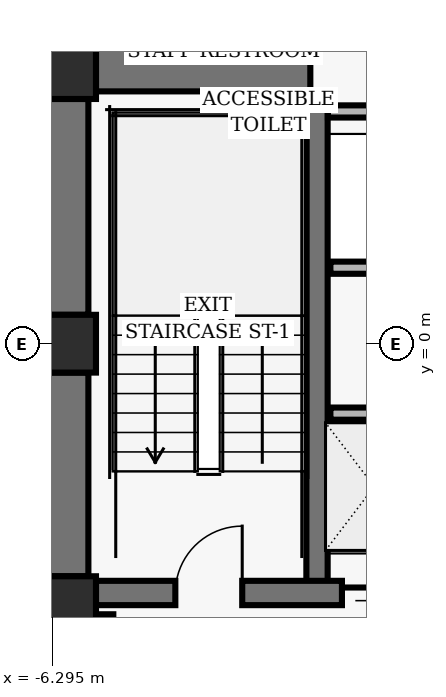
"""IFC4 building model, lengths in metres.
Left out: names, types, materials, properties, quantities, classifications, styles, units other than length and angle.
Written with IfcOpenShell. Run it as: python <this file> out.ifc"""

import sys

from ifc_helpers import new_model, si_unit, direction, frame, frame_2d, origin, origin_2d, place, context, subcontext, project, spatial, rectangle, hollow_rectangle, extrude, element, fill, save


model = new_model("IFC4")
c1 = context("Model", 3, precision=1e-05, world=origin(), true_north=direction((0.0, 1.0)))
c2 = subcontext(c1, "Body", "Model", "MODEL_VIEW")
j1 = project(units=[si_unit("LENGTHUNIT", "METRE"), si_unit("PLANEANGLEUNIT", "RADIAN")], contexts=[c1])
p1 = place(None, origin())
s1 = spatial("IfcSite", under=j1, at=p1, CompositionType="ELEMENT")
p2 = place(p1, origin())
s2 = spatial("IfcBuilding", under=s1, at=p2, CompositionType="ELEMENT")
p3 = place(p2, frame((0.0, 0.0, 91.68)))
s3 = spatial("IfcBuildingStorey", under=s2, at=p3, CompositionType="ELEMENT", Elevation=91.68)
for number, where, z_axis, x_axis in (
    (1, (-6.05, 4.5, 0.0), (0.0, 0.0, 1.0), (1.0, 0.0, 0.0)),
    (2, (-6.05, 0.0, 0.0), (0.0, 0.0, 1.0), (1.0, 0.0, 0.0)),
    (3, (-6.05, -4.3, 0.0), (0.0, 0.0, 1.0), (1.0, 0.0, 0.0)),
):
    element("IfcColumn", number, at=place(p3, frame(where, z_axis=z_axis, x_axis=x_axis)), inside=s3, PredefinedType="COLUMN", context=c2, shape_type="SweptSolid", body=[
        extrude(hollow_rectangle(XDim=0.95, YDim=0.95, WallThickness=0.06, InnerFilletRadius=0.02, OuterFilletRadius=0.04, at=origin_2d()), origin(), (0.0, 0.0, 1.0), 3.04),
    ])
p4 = place(p3, frame((-6.05, 0.475, 0.0), z_axis=(0.0, 0.0, 1.0), x_axis=(0.0, 1.0, 0.0)))
e4 = element("IfcWall", 4, at=p4, inside=s3, PredefinedType="SHEAR", context=c2, shape_type="SweptSolid", body=[
    extrude(rectangle(XDim=3.55, YDim=0.7, at=frame_2d((1.775, 0.0))), origin(), (0.0, 0.0, 1.0), 2.788),
])
p5 = place(p3, frame((-6.05, -3.825, 0.0), z_axis=(0.0, 0.0, 1.0), x_axis=(0.0, 1.0, 0.0)))
e5 = element("IfcWall", 5, at=p5, inside=s3, PredefinedType="SHEAR", context=c2, shape_type="SweptSolid", body=[
    extrude(rectangle(XDim=3.35, YDim=0.7, at=frame_2d((1.675, 0.0))), origin(), (0.0, 0.0, 1.0), 2.788),
])
p6 = place(p3, frame((-1.94, -4.1, 0.0), z_axis=(0.0, 0.0, 1.0), x_axis=(0.0, 1.0, 0.0)))
e6 = element("IfcWall", 6, at=p6, inside=s3, PredefinedType="SHEAR", context=c2, shape_type="SweptSolid", body=[
    extrude(rectangle(XDim=8.2, YDim=0.35, at=frame_2d((4.1, 0.0))), origin(), (0.0, 0.0, 1.0), 2.788),
])
p7 = place(p3, frame((-5.575, -4.1, 0.0), z_axis=(0.0, 0.0, 1.0), x_axis=(1.0, 0.0, 0.0)))
e7 = element("IfcWall", 7, at=p7, inside=s3, PredefinedType="SHEAR", context=c2, shape_type="SweptSolid", body=[
    extrude(rectangle(XDim=11.15, YDim=0.4, at=frame_2d((5.575, 0.0))), origin(), (0.0, 0.0, 1.0), 2.788),
])
p8 = place(p7, frame((1.305, 0.0, 0.0)))
e8 = element("IfcOpeningElement", 8, at=p8, cuts=e7, PredefinedType="OPENING", context=c2, shape_type="SweptSolid", body=[
    extrude(rectangle(XDim=1.1, YDim=2.04, at=frame_2d((0.55, 1.02))), frame((0.0, 0.21, 0.0), z_axis=(0.0, -1.0, 0.0), x_axis=(1.0, 0.0, 0.0)), (0.0, 0.0, 1.0), 0.42),
])
p9 = place(p7, frame((8.745, 0.0, 0.0)))
e9 = element("IfcOpeningElement", 9, at=p9, cuts=e7, PredefinedType="OPENING", context=c2, shape_type="SweptSolid", body=[
    extrude(rectangle(XDim=1.1, YDim=2.04, at=frame_2d((0.55, 1.02))), frame((0.0, 0.21, 0.0), z_axis=(0.0, -1.0, 0.0), x_axis=(1.0, 0.0, 0.0)), (0.0, 0.0, 1.0), 0.42),
])
p10 = place(p7, frame((4.045, 0.0, 0.0)))
e10 = element("IfcOpeningElement", 10, at=p10, cuts=e7, PredefinedType="OPENING", context=c2, shape_type="SweptSolid", body=[
    extrude(rectangle(XDim=1.06, YDim=2.04, at=frame_2d((0.53, 1.02))), frame((0.0, 0.21, 0.0), z_axis=(0.0, -1.0, 0.0), x_axis=(1.0, 0.0, 0.0)), (0.0, 0.0, 1.0), 0.42),
])
p11 = place(p7, frame((6.045, 0.0, 0.0)))
e11 = element("IfcOpeningElement", 11, at=p11, cuts=e7, PredefinedType="OPENING", context=c2, shape_type="SweptSolid", body=[
    extrude(rectangle(XDim=1.06, YDim=2.04, at=frame_2d((0.53, 1.02))), frame((0.0, 0.21, 0.0), z_axis=(0.0, -1.0, 0.0), x_axis=(1.0, 0.0, 0.0)), (0.0, 0.0, 1.0), 0.42),
])
p12 = place(p3, frame((-5.575, 4.5, 0.0), z_axis=(0.0, 0.0, 1.0), x_axis=(1.0, 0.0, 0.0)))
e12 = element("IfcWall", 12, at=p12, inside=s3, PredefinedType="SHEAR", context=c2, shape_type="SweptSolid", body=[
    extrude(rectangle(XDim=3.525, YDim=0.7, at=frame_2d((1.762, 0.0))), origin(), (0.0, 0.0, 1.0), 2.788),
])
p13 = place(p3, frame((-1.72, -1.15, 0.0), z_axis=(0.0, 0.0, 1.0), x_axis=(1.0, 0.0, 0.0)))
e13 = element("IfcWall", 13, at=p13, inside=s3, PredefinedType="PARTITIONING", context=c2, shape_type="SweptSolid", body=[
    extrude(rectangle(XDim=3.44, YDim=0.2, at=frame_2d((1.72, 0.0))), origin(), (0.0, 0.0, 1.0), 2.763),
])
p14 = place(p3, frame((-5.4, -7.16, 0.0), z_axis=(0.0, 0.0, 1.0), x_axis=(0.0, 1.0, 0.0)))
e14 = element("IfcWall", 14, at=p14, inside=s3, PredefinedType="PARTITIONING", context=c2, shape_type="SweptSolid", body=[
    extrude(rectangle(XDim=2.71, YDim=0.22, at=frame_2d((1.355, 0.0))), origin(), (0.0, 0.0, 1.0), 2.763),
])
p15 = place(p3, frame((-1.72, 1.25, 0.0), z_axis=(0.0, 0.0, 1.0), x_axis=(1.0, 0.0, 0.0)))
e15 = element("IfcWall", 15, at=p15, inside=s3, PredefinedType="PARTITIONING", context=c2, shape_type="SweptSolid", body=[
    extrude(rectangle(XDim=3.44, YDim=0.2, at=frame_2d((1.72, 0.0))), origin(), (0.0, 0.0, 1.0), 2.763),
])
p16 = place(p3, frame((-1.76, 3.82, 0.0), z_axis=(0.0, 0.0, 1.0), x_axis=(1.0, 0.0, 0.0)))
e16 = element("IfcWall", 16, at=p16, inside=s3, PredefinedType="PARTITIONING", context=c2, shape_type="SweptSolid", body=[
    extrude(rectangle(XDim=3.52, YDim=0.2, at=frame_2d((1.76, 0.0))), origin(), (0.0, 0.0, 1.0), 2.763),
])
p17 = place(p8, origin())
e17 = element("IfcDoor", 17, at=p17, inside=s3, OperationType="SINGLE_SWING_RIGHT", PredefinedType="DOOR", context=c2, shape_type="SweptSolid", body=[
    extrude(rectangle(XDim=1.1, YDim=2.04, at=frame_2d((0.55, 1.02))), frame((0.0, 0.025, 0.0), z_axis=(0.0, -1.0, 0.0), x_axis=(1.0, 0.0, 0.0)), (0.0, 0.0, 1.0), 0.05),
])
fill(e8, e17)
p18 = place(p10, origin())
e18 = element("IfcDoor", 18, at=p18, inside=s3, OperationType="SLIDING_TO_LEFT", PredefinedType="DOOR", context=c2, shape_type="SweptSolid", body=[
    extrude(rectangle(XDim=1.06, YDim=2.04, at=frame_2d((0.53, 1.02))), frame((0.0, 0.025, 0.0), z_axis=(0.0, -1.0, 0.0), x_axis=(1.0, 0.0, 0.0)), (0.0, 0.0, 1.0), 0.05),
])
fill(e10, e18)
save(model, sys.argv[1])
